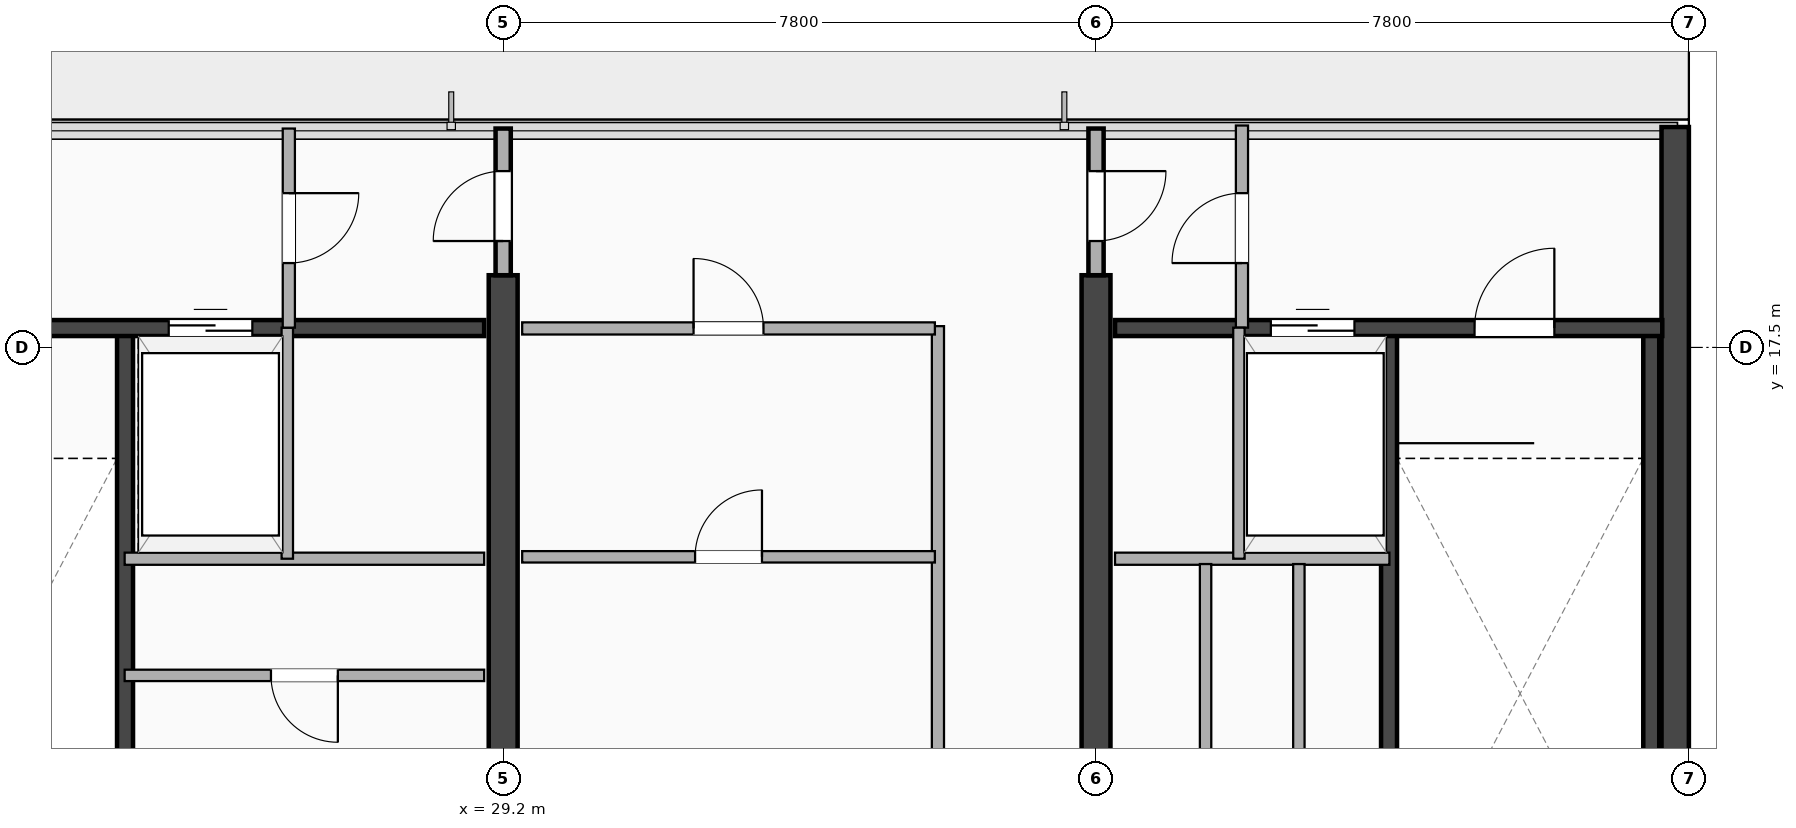
"""IFC4 building model, lengths in metres.
Left out: names, types, materials, properties, quantities, classifications, styles, units other than length and angle.
Written with IfcOpenShell. Run it as: python <this file> out.ifc"""

import sys

from ifc_helpers import new_model, si_unit, direction, frame, frame_2d, origin, place, context, subcontext, project, spatial, rectangle, extrude, element, fill, save


model = new_model("IFC4")
c1 = context("Model", 3, precision=1e-05, world=origin(), true_north=direction((0.0, 1.0)))
c2 = subcontext(c1, "Body", "Model", "MODEL_VIEW")
j1 = project(units=[si_unit("LENGTHUNIT", "METRE"), si_unit("PLANEANGLEUNIT", "RADIAN")], contexts=[c1])
p1 = place(None, origin())
s1 = spatial("IfcSite", under=j1, at=p1, CompositionType="ELEMENT")
p2 = place(p1, origin())
s2 = spatial("IfcBuilding", under=s1, at=p2, CompositionType="ELEMENT")
p3 = place(p2, frame((0.0, 0.0, 317.1)))
s3 = spatial("IfcBuildingStorey", under=s2, at=p3, CompositionType="ELEMENT", Elevation=317.1)
p4 = place(p3, frame((44.62, 3.5, 0.0), z_axis=(0.0, 0.0, 1.0), x_axis=(0.0, 1.0, 0.0)))
e1 = element("IfcWall", 1, at=p4, inside=s3, PredefinedType="SHEAR", context=c2, shape_type="SweptSolid", body=[
    extrude(rectangle(XDim=16.9, YDim=0.36, at=frame_2d((8.45, 0.0))), origin(), (0.0, 0.0, 1.0), 4.3),
])
p5 = place(p3, frame((29.2, 3.5, 0.0), z_axis=(0.0, 0.0, 1.0), x_axis=(0.0, 1.0, 0.0)))
e2 = element("IfcWall", 2, at=p5, inside=s3, PredefinedType="SHEAR", context=c2, shape_type="SweptSolid", body=[
    extrude(rectangle(XDim=14.95, YDim=0.38, at=frame_2d((7.475, 0.0))), origin(), (0.0, 0.0, 1.0), 4.3),
])
p6 = place(p5, frame((7.75, 0.0, 0.0), z_axis=(0.0, 0.0, 1.0), x_axis=(-1.0, 0.0, 0.0)))
e3 = element("IfcOpeningElement", 3, at=p6, cuts=e2, PredefinedType="OPENING", context=c2, shape_type="SweptSolid", body=[
    extrude(rectangle(XDim=1.1, YDim=2.15, at=frame_2d((0.55, 1.075))), frame((0.0, 0.2, 0.0), z_axis=(0.0, -1.0, 0.0), x_axis=(1.0, 0.0, 0.0)), (0.0, 0.0, 1.0), 0.4),
])
p7 = place(p3, frame((37.0, 3.5, 0.0), z_axis=(0.0, 0.0, 1.0), x_axis=(0.0, 1.0, 0.0)))
e4 = element("IfcWall", 4, at=p7, inside=s3, PredefinedType="SHEAR", context=c2, shape_type="SweptSolid", body=[
    extrude(rectangle(XDim=14.95, YDim=0.38, at=frame_2d((7.475, 0.0))), origin(), (0.0, 0.0, 1.0), 4.3),
])
p8 = place(p7, frame((6.65, 0.0, 0.0)))
e5 = element("IfcOpeningElement", 5, at=p8, cuts=e4, PredefinedType="OPENING", context=c2, shape_type="SweptSolid", body=[
    extrude(rectangle(XDim=1.1, YDim=2.15, at=frame_2d((0.55, 1.075))), frame((0.0, 0.2, 0.0), z_axis=(0.0, -1.0, 0.0), x_axis=(1.0, 0.0, 0.0)), (0.0, 0.0, 1.0), 0.4),
])
p9 = place(p3, frame((24.225, 9.745, 0.0), z_axis=(0.0, 0.0, 1.0), x_axis=(0.0, 1.0, 0.0)))
e6 = element("IfcWall", 6, at=p9, inside=s3, PredefinedType="SHEAR", context=c2, shape_type="SweptSolid", body=[
    extrude(rectangle(XDim=8.01, YDim=0.21, at=frame_2d((4.005, 0.0))), origin(), (0.0, 0.0, 1.0), 4.3),
])
p10 = place(p3, frame((20.65, 17.755, 0.0), z_axis=(0.0, 0.0, 1.0), x_axis=(1.0, 0.0, 0.0)))
e7 = element("IfcWall", 7, at=p10, inside=s3, PredefinedType="SHEAR", context=c2, shape_type="SweptSolid", body=[
    extrude(rectangle(XDim=8.3, YDim=0.21, at=frame_2d((4.15, 0.0))), origin(), (0.0, 0.0, 1.0), 4.3),
])
p11 = place(p10, frame((2.2, 0.0, 0.0), z_axis=(0.0, 0.0, 1.0), x_axis=(-1.0, 0.0, 0.0)))
e8 = element("IfcOpeningElement", 8, at=p11, cuts=e7, PredefinedType="OPENING", context=c2, shape_type="SweptSolid", body=[
    extrude(rectangle(XDim=1.05, YDim=2.15, at=frame_2d((0.525, 1.075))), frame((0.0, 0.115, 0.0), z_axis=(0.0, -1.0, 0.0), x_axis=(1.0, 0.0, 0.0)), (0.0, 0.0, 1.0), 0.23),
])
p12 = place(p10, frame((4.15, 0.0, 0.0)))
e9 = element("IfcOpeningElement", 9, at=p12, cuts=e7, PredefinedType="OPENING", context=c2, shape_type="SweptSolid", body=[
    extrude(rectangle(XDim=1.1, YDim=2.18, at=frame_2d((0.55, 1.09))), frame((0.0, 0.115, 0.0), z_axis=(0.0, -1.0, 0.0), x_axis=(1.0, 0.0, 0.0)), (0.0, 0.0, 1.0), 0.23),
])
for number, where, z_axis, x_axis in (
    (10, (40.855, 9.745, 0.0), (0.0, 0.0, 1.0), (0.0, 1.0, 0.0)),
    (11, (44.305, 9.745, 0.0), (0.0, 0.0, 1.0), (0.0, 1.0, 0.0)),
):
    element("IfcWall", number, at=place(p3, frame(where, z_axis=z_axis, x_axis=x_axis)), inside=s3, PredefinedType="SHEAR", context=c2, shape_type="SweptSolid", body=[
        extrude(rectangle(XDim=8.01, YDim=0.21, at=frame_2d((4.005, 0.0))), origin(), (0.0, 0.0, 1.0), 4.3),
    ])
p13 = place(p3, frame((37.25, 17.755, 0.0), z_axis=(0.0, 0.0, 1.0), x_axis=(1.0, 0.0, 0.0)))
e12 = element("IfcWall", 12, at=p13, inside=s3, PredefinedType="SHEAR", context=c2, shape_type="SweptSolid", body=[
    extrude(rectangle(XDim=7.2, YDim=0.21, at=frame_2d((3.6, 0.0))), origin(), (0.0, 0.0, 1.0), 4.3),
])
p14 = place(p13, frame((2.05, 0.0, 0.0)))
e13 = element("IfcOpeningElement", 13, at=p14, cuts=e12, PredefinedType="OPENING", context=c2, shape_type="SweptSolid", body=[
    extrude(rectangle(XDim=1.1, YDim=2.18, at=frame_2d((0.55, 1.09))), frame((0.0, 0.115, 0.0), z_axis=(0.0, -1.0, 0.0), x_axis=(1.0, 0.0, 0.0)), (0.0, 0.0, 1.0), 0.23),
])
p15 = place(p13, frame((5.78, 0.0, 0.0), z_axis=(0.0, 0.0, 1.0), x_axis=(-1.0, 0.0, 0.0)))
e14 = element("IfcOpeningElement", 14, at=p15, cuts=e12, PredefinedType="OPENING", context=c2, shape_type="SweptSolid", body=[
    extrude(rectangle(XDim=1.05, YDim=2.15, at=frame_2d((0.525, 1.075))), frame((0.0, 0.115, 0.0), z_axis=(0.0, -1.0, 0.0), x_axis=(1.0, 0.0, 0.0)), (0.0, 0.0, 1.0), 0.23),
])
p16 = place(p3, frame((38.92, 17.76, 0.0), z_axis=(0.0, 0.0, 1.0), x_axis=(0.0, 1.0, 0.0)))
e15 = element("IfcWall", 15, at=p16, inside=s3, PredefinedType="PARTITIONING", context=c2, shape_type="SweptSolid", body=[
    extrude(rectangle(XDim=2.66, YDim=0.16, at=frame_2d((1.33, 0.0))), origin(), (0.0, 0.0, 1.0), 4.3),
])
p17 = place(p16, frame((1.77, 0.0, 0.0), z_axis=(0.0, 0.0, 1.0), x_axis=(-1.0, 0.0, 0.0)))
e16 = element("IfcOpeningElement", 16, at=p17, cuts=e15, PredefinedType="OPENING", context=c2, shape_type="SweptSolid", body=[
    extrude(rectangle(XDim=0.92, YDim=2.08, at=frame_2d((0.46, 1.04))), frame((0.0, 0.09, 0.0), z_axis=(0.0, -1.0, 0.0), x_axis=(1.0, 0.0, 0.0)), (0.0, 0.0, 1.0), 0.18),
])
p18 = place(p3, frame((24.22, 14.72, 0.0), z_axis=(0.0, 0.0, 1.0), x_axis=(1.0, 0.0, 0.0)))
e17 = element("IfcWall", 17, at=p18, inside=s3, PredefinedType="PARTITIONING", context=c2, shape_type="SweptSolid", body=[
    extrude(rectangle(XDim=4.73, YDim=0.16, at=frame_2d((2.365, 0.0))), origin(), (0.0, 0.0, 1.0), 4.3),
])
p19 = place(p3, frame((26.36, 14.72, 0.0), z_axis=(0.0, 0.0, 1.0), x_axis=(0.0, 1.0, 0.0)))
e18 = element("IfcWall", 18, at=p19, inside=s3, PredefinedType="PARTITIONING", context=c2, shape_type="SweptSolid", body=[
    extrude(rectangle(XDim=3.04, YDim=0.15, at=frame_2d((1.52, 0.0))), origin(), (0.0, 0.0, 1.0), 4.3),
])
p20 = place(p3, frame((37.25, 14.72, 0.0), z_axis=(0.0, 0.0, 1.0), x_axis=(1.0, 0.0, 0.0)))
e19 = element("IfcWall", 19, at=p20, inside=s3, PredefinedType="PARTITIONING", context=c2, shape_type="SweptSolid", body=[
    extrude(rectangle(XDim=3.61, YDim=0.16, at=frame_2d((1.805, 0.0))), origin(), (0.0, 0.0, 1.0), 4.3),
])
p21 = place(p3, frame((38.88, 14.72, 0.0), z_axis=(0.0, 0.0, 1.0), x_axis=(0.0, 1.0, 0.0)))
e20 = element("IfcWall", 20, at=p21, inside=s3, PredefinedType="PARTITIONING", context=c2, shape_type="SweptSolid", body=[
    extrude(rectangle(XDim=3.04, YDim=0.15, at=frame_2d((1.52, 0.0))), origin(), (0.0, 0.0, 1.0), 4.3),
])
p22 = place(p3, frame((26.38, 17.76, 0.0), z_axis=(0.0, 0.0, 1.0), x_axis=(0.0, 1.0, 0.0)))
e21 = element("IfcWall", 21, at=p22, inside=s3, PredefinedType="PARTITIONING", context=c2, shape_type="SweptSolid", body=[
    extrude(rectangle(XDim=2.62, YDim=0.16, at=frame_2d((1.31, 0.0))), origin(), (0.0, 0.0, 1.0), 4.3),
])
p23 = place(p22, frame((0.85, 0.0, 0.0)))
e22 = element("IfcOpeningElement", 22, at=p23, cuts=e21, PredefinedType="OPENING", context=c2, shape_type="SweptSolid", body=[
    extrude(rectangle(XDim=0.92, YDim=2.08, at=frame_2d((0.46, 1.04))), frame((0.0, 0.09, 0.0), z_axis=(0.0, -1.0, 0.0), x_axis=(1.0, 0.0, 0.0)), (0.0, 0.0, 1.0), 0.18),
])
p24 = place(p3, frame((29.2, 18.45, 0.0), z_axis=(0.0, 0.0, 1.0), x_axis=(0.0, 1.0, 0.0)))
e23 = element("IfcWall", 23, at=p24, inside=s3, PredefinedType="PARTITIONING", context=c2, shape_type="SweptSolid", body=[
    extrude(rectangle(XDim=1.93, YDim=0.2, at=frame_2d((0.965, 0.0))), origin(), (0.0, 0.0, 1.0), 4.3),
])
p25 = place(p24, frame((1.37, 0.0, 0.0), z_axis=(0.0, 0.0, 1.0), x_axis=(-1.0, 0.0, 0.0)))
e24 = element("IfcOpeningElement", 24, at=p25, cuts=e23, PredefinedType="OPENING", context=c2, shape_type="SweptSolid", body=[
    extrude(rectangle(XDim=0.92, YDim=2.08, at=frame_2d((0.46, 1.04))), frame((0.0, 0.11, 0.0), z_axis=(0.0, -1.0, 0.0), x_axis=(1.0, 0.0, 0.0)), (0.0, 0.0, 1.0), 0.22),
])
p26 = place(p3, frame((37.0, 18.45, 0.0), z_axis=(0.0, 0.0, 1.0), x_axis=(0.0, 1.0, 0.0)))
e25 = element("IfcWall", 25, at=p26, inside=s3, PredefinedType="PARTITIONING", context=c2, shape_type="SweptSolid", body=[
    extrude(rectangle(XDim=1.93, YDim=0.2, at=frame_2d((0.965, 0.0))), origin(), (0.0, 0.0, 1.0), 4.3),
])
p27 = place(p26, frame((0.45, 0.0, 0.0)))
e26 = element("IfcOpeningElement", 26, at=p27, cuts=e25, PredefinedType="OPENING", context=c2, shape_type="SweptSolid", body=[
    extrude(rectangle(XDim=0.92, YDim=2.08, at=frame_2d((0.46, 1.04))), frame((0.0, 0.11, 0.0), z_axis=(0.0, -1.0, 0.0), x_axis=(1.0, 0.0, 0.0)), (0.0, 0.0, 1.0), 0.22),
])
p28 = place(p3, frame((24.22, 13.185, 0.0), z_axis=(0.0, 0.0, 1.0), x_axis=(1.0, 0.0, 0.0)))
e27 = element("IfcWall", 27, at=p28, inside=s3, PredefinedType="PARTITIONING", context=c2, shape_type="SweptSolid", body=[
    extrude(rectangle(XDim=4.73, YDim=0.15, at=frame_2d((2.365, 0.0))), origin(), (0.0, 0.0, 1.0), 4.3),
])
p29 = place(p28, frame((1.925, 0.0, 0.0)))
e28 = element("IfcOpeningElement", 28, at=p29, cuts=e27, PredefinedType="OPENING", context=c2, shape_type="SweptSolid", body=[
    extrude(rectangle(XDim=0.88, YDim=2.08, at=frame_2d((0.44, 1.04))), frame((0.0, 0.085, 0.0), z_axis=(0.0, -1.0, 0.0), x_axis=(1.0, 0.0, 0.0)), (0.0, 0.0, 1.0), 0.17),
])
for number, where, z_axis, x_axis in (
    (29, (38.441, 11.72, 0.0), (0.0, 0.0, 1.0), (0.0, 1.0, 0.0)),
    (30, (39.669, 11.72, 0.0), (0.0, 0.0, 1.0), (0.0, 1.0, 0.0)),
):
    element("IfcWall", number, at=place(p3, frame(where, z_axis=z_axis, x_axis=x_axis)), inside=s3, PredefinedType="PARTITIONING", context=c2, shape_type="SweptSolid", body=[
        extrude(rectangle(XDim=2.93, YDim=0.15, at=frame_2d((1.465, 0.0))), origin(), (0.0, 0.0, 1.0), 4.3),
    ])
p30 = place(p3, frame((34.92, 11.68, 0.0), z_axis=(0.0, 0.0, 1.0), x_axis=(0.0, 1.0, 0.0)))
e31 = element("IfcWall", 31, at=p30, inside=s3, PredefinedType="PARTITIONING", context=c2, shape_type="SweptSolid", body=[
    extrude(rectangle(XDim=6.1, YDim=0.16, at=frame_2d((3.05, 0.0))), origin(), (0.0, 0.0, 1.0), 4.3),
])
p31 = place(p3, frame((29.45, 17.75, 0.0), z_axis=(0.0, 0.0, 1.0), x_axis=(1.0, 0.0, 0.0)))
e32 = element("IfcWall", 32, at=p31, inside=s3, PredefinedType="PARTITIONING", context=c2, shape_type="SweptSolid", body=[
    extrude(rectangle(XDim=5.43, YDim=0.16, at=frame_2d((2.715, 0.0))), origin(), (0.0, 0.0, 1.0), 4.3),
])
p32 = place(p31, frame((3.175, 0.0, 0.0), z_axis=(0.0, 0.0, 1.0), x_axis=(-1.0, 0.0, 0.0)))
e33 = element("IfcOpeningElement", 33, at=p32, cuts=e32, PredefinedType="OPENING", context=c2, shape_type="SweptSolid", body=[
    extrude(rectangle(XDim=0.92, YDim=2.08, at=frame_2d((0.46, 1.04))), frame((0.0, 0.09, 0.0), z_axis=(0.0, -1.0, 0.0), x_axis=(1.0, 0.0, 0.0)), (0.0, 0.0, 1.0), 0.18),
])
p33 = place(p3, frame((29.45, 14.745, 0.0), z_axis=(0.0, 0.0, 1.0), x_axis=(1.0, 0.0, 0.0)))
e34 = element("IfcWall", 34, at=p33, inside=s3, PredefinedType="PARTITIONING", context=c2, shape_type="SweptSolid", body=[
    extrude(rectangle(XDim=5.43, YDim=0.15, at=frame_2d((2.715, 0.0))), origin(), (0.0, 0.0, 1.0), 4.3),
])
p34 = place(p33, frame((3.155, 0.0, 0.0), z_axis=(0.0, 0.0, 1.0), x_axis=(-1.0, 0.0, 0.0)))
e35 = element("IfcOpeningElement", 35, at=p34, cuts=e34, PredefinedType="OPENING", context=c2, shape_type="SweptSolid", body=[
    extrude(rectangle(XDim=0.88, YDim=2.08, at=frame_2d((0.44, 1.04))), frame((0.0, 0.085, 0.0), z_axis=(0.0, -1.0, 0.0), x_axis=(1.0, 0.0, 0.0)), (0.0, 0.0, 1.0), 0.17),
])
p35 = place(p12, origin())
e36 = element("IfcDoor", 36, at=p35, inside=s3, OperationType="DOUBLE_DOOR_SLIDING", PredefinedType="DOOR", context=c2, shape_type="SweptSolid", body=[
    extrude(rectangle(XDim=1.1, YDim=2.18, at=frame_2d((0.55, 1.09))), frame((0.0, 0.025, 0.0), z_axis=(0.0, -1.0, 0.0), x_axis=(1.0, 0.0, 0.0)), (0.0, 0.0, 1.0), 0.05),
])
fill(e9, e36)
p36 = place(p14, origin())
e37 = element("IfcDoor", 37, at=p36, inside=s3, OperationType="DOUBLE_DOOR_SLIDING", PredefinedType="DOOR", context=c2, shape_type="SweptSolid", body=[
    extrude(rectangle(XDim=1.1, YDim=2.18, at=frame_2d((0.55, 1.09))), frame((0.0, 0.025, 0.0), z_axis=(0.0, -1.0, 0.0), x_axis=(1.0, 0.0, 0.0)), (0.0, 0.0, 1.0), 0.05),
])
fill(e13, e37)
p37 = place(p15, origin())
e38 = element("IfcDoor", 38, at=p37, inside=s3, OperationType="SINGLE_SWING_RIGHT", PredefinedType="DOOR", context=c2, shape_type="SweptSolid", body=[
    extrude(rectangle(XDim=1.05, YDim=2.15, at=frame_2d((0.525, 1.075))), frame((0.0, 0.025, 0.0), z_axis=(0.0, -1.0, 0.0), x_axis=(1.0, 0.0, 0.0)), (0.0, 0.0, 1.0), 0.05),
])
fill(e14, e38)
p38 = place(p17, origin())
e39 = element("IfcDoor", 39, at=p38, inside=s3, OperationType="SINGLE_SWING_LEFT", PredefinedType="DOOR", context=c2, shape_type="SweptSolid", body=[
    extrude(rectangle(XDim=0.92, YDim=2.08, at=frame_2d((0.46, 1.04))), frame((0.0, 0.025, 0.0), z_axis=(0.0, -1.0, 0.0), x_axis=(1.0, 0.0, 0.0)), (0.0, 0.0, 1.0), 0.05),
])
fill(e16, e39)
p39 = place(p23, origin())
e40 = element("IfcDoor", 40, at=p39, inside=s3, OperationType="SINGLE_SWING_RIGHT", PredefinedType="DOOR", context=c2, shape_type="SweptSolid", body=[
    extrude(rectangle(XDim=0.92, YDim=2.08, at=frame_2d((0.46, 1.04))), frame((0.0, 0.025, 0.0), z_axis=(0.0, -1.0, 0.0), x_axis=(1.0, 0.0, 0.0)), (0.0, 0.0, 1.0), 0.05),
])
fill(e22, e40)
p40 = place(p25, origin())
e41 = element("IfcDoor", 41, at=p40, inside=s3, OperationType="SINGLE_SWING_LEFT", PredefinedType="DOOR", context=c2, shape_type="SweptSolid", body=[
    extrude(rectangle(XDim=0.92, YDim=2.08, at=frame_2d((0.46, 1.04))), frame((0.0, 0.025, 0.0), z_axis=(0.0, -1.0, 0.0), x_axis=(1.0, 0.0, 0.0)), (0.0, 0.0, 1.0), 0.05),
])
fill(e24, e41)
p41 = place(p27, origin())
e42 = element("IfcDoor", 42, at=p41, inside=s3, OperationType="SINGLE_SWING_RIGHT", PredefinedType="DOOR", context=c2, shape_type="SweptSolid", body=[
    extrude(rectangle(XDim=0.92, YDim=2.08, at=frame_2d((0.46, 1.04))), frame((0.0, 0.025, 0.0), z_axis=(0.0, -1.0, 0.0), x_axis=(1.0, 0.0, 0.0)), (0.0, 0.0, 1.0), 0.05),
])
fill(e26, e42)
p42 = place(p29, origin())
e43 = element("IfcDoor", 43, at=p42, inside=s3, OperationType="SINGLE_SWING_RIGHT", PredefinedType="DOOR", context=c2, shape_type="SweptSolid", body=[
    extrude(rectangle(XDim=0.88, YDim=2.08, at=frame_2d((0.44, 1.04))), frame((0.0, 0.025, 0.0), z_axis=(0.0, -1.0, 0.0), x_axis=(1.0, 0.0, 0.0)), (0.0, 0.0, 1.0), 0.05),
])
fill(e28, e43)
p43 = place(p32, origin())
e44 = element("IfcDoor", 44, at=p43, inside=s3, OperationType="SINGLE_SWING_LEFT", PredefinedType="DOOR", context=c2, shape_type="SweptSolid", body=[
    extrude(rectangle(XDim=0.92, YDim=2.08, at=frame_2d((0.46, 1.04))), frame((0.0, 0.025, 0.0), z_axis=(0.0, -1.0, 0.0), x_axis=(1.0, 0.0, 0.0)), (0.0, 0.0, 1.0), 0.05),
])
fill(e33, e44)
p44 = place(p34, origin())
e45 = element("IfcDoor", 45, at=p44, inside=s3, OperationType="SINGLE_SWING_RIGHT", PredefinedType="DOOR", context=c2, shape_type="SweptSolid", body=[
    extrude(rectangle(XDim=0.88, YDim=2.08, at=frame_2d((0.44, 1.04))), frame((0.0, 0.025, 0.0), z_axis=(0.0, -1.0, 0.0), x_axis=(1.0, 0.0, 0.0)), (0.0, 0.0, 1.0), 0.05),
])
fill(e35, e45)
save(model, sys.argv[1])
